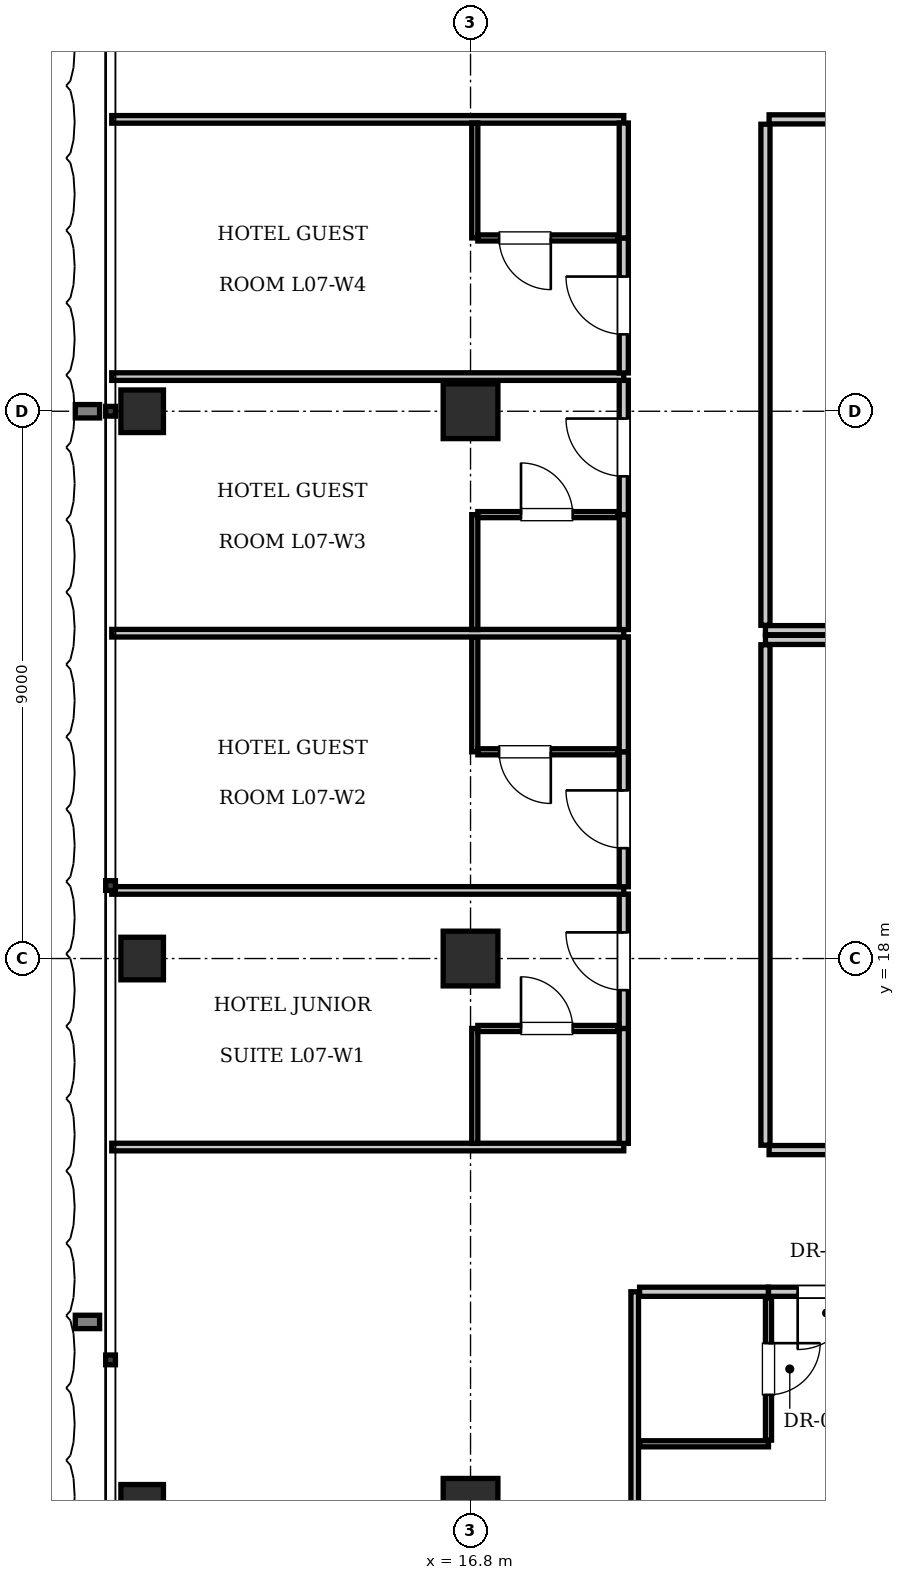
"""IFC4 building model, lengths in metres.
Left out: names, types, materials, properties, quantities, classifications, styles, units other than length and angle.
Written with IfcOpenShell. Run it as: python <this file> out.ifc"""

import sys

from ifc_helpers import new_model, si_unit, direction, frame, frame_2d, origin, origin_2d, place, context, subcontext, project, spatial, rectangle, i_section, extrude, element, fill, save


model = new_model("IFC4")
c1 = context("Model", 3, precision=1e-05, world=origin(), true_north=direction((0.0, 1.0)))
c2 = subcontext(c1, "Body", "Model", "MODEL_VIEW")
j1 = project(units=[si_unit("LENGTHUNIT", "METRE"), si_unit("PLANEANGLEUNIT", "RADIAN")], contexts=[c1])
p1 = place(None, origin())
s1 = spatial("IfcSite", under=j1, at=p1, CompositionType="ELEMENT")
p2 = place(p1, origin())
s2 = spatial("IfcBuilding", under=s1, at=p2, CompositionType="ELEMENT")
p3 = place(p2, frame((0.0, 0.0, 34.65)))
s3 = spatial("IfcBuildingStorey", under=s2, at=p3, CompositionType="ELEMENT", Elevation=34.65)
for number, where, z_axis, x_axis in (
    (1, (16.8, 9.0, 0.0), (0.0, 0.0, 1.0), (1.0, 0.0, 0.0)),
    (2, (16.8, 18.0, 0.0), (0.0, 0.0, 1.0), (1.0, 0.0, 0.0)),
    (3, (16.8, 27.0, 0.0), (0.0, 0.0, 1.0), (1.0, 0.0, 0.0)),
):
    element("IfcColumn", number, at=place(p3, frame(where, z_axis=z_axis, x_axis=x_axis)), inside=s3, PredefinedType="COLUMN", context=c2, shape_type="SweptSolid", body=[
        extrude(rectangle(XDim=0.9, YDim=0.9, at=origin_2d()), origin(), (0.0, 0.0, 1.0), 3.85),
    ])
for number, where, z_axis, x_axis in (
    (4, (11.4, 9.0, 0.0), (0.0, 0.0, 1.0), (1.0, 0.0, 0.0)),
    (5, (11.4, 18.0, 0.0), (0.0, 0.0, 1.0), (1.0, 0.0, 0.0)),
    (6, (11.4, 27.0, 0.0), (0.0, 0.0, 1.0), (1.0, 0.0, 0.0)),
):
    element("IfcColumn", number, at=place(p3, frame(where, z_axis=z_axis, x_axis=x_axis)), inside=s3, PredefinedType="COLUMN", context=c2, shape_type="SweptSolid", body=[
        extrude(i_section(OverallWidth=0.7, OverallDepth=0.7, WebThickness=0.028, FlangeThickness=0.044, at=origin_2d()), origin(), (0.0, 0.0, 1.0), 3.85),
    ])
p4 = place(p3, frame((21.65, 23.4, 0.0), z_axis=(0.0, 0.0, 1.0), x_axis=(1.0, 0.0, 0.0)))
e7 = element("IfcWall", 7, at=p4, inside=s3, PredefinedType="PARTITIONING", context=c2, shape_type="SweptSolid", body=[
    extrude(rectangle(XDim=32.3, YDim=0.15, at=frame_2d((16.15, 0.0))), origin(), (0.0, 0.0, 1.0), 3.61),
])
p5 = place(p3, frame((21.65, 23.48, 0.0), z_axis=(0.0, 0.0, 1.0), x_axis=(0.0, 1.0, 0.0)))
e8 = element("IfcWall", 8, at=p5, inside=s3, PredefinedType="PARTITIONING", context=c2, shape_type="SweptSolid", body=[
    extrude(rectangle(XDim=8.24, YDim=0.15, at=frame_2d((4.12, 0.0))), origin(), (0.0, 0.0, 1.0), 3.61),
])
p6 = place(p3, frame((21.71, 31.8, 0.0), z_axis=(0.0, 0.0, 1.0), x_axis=(1.0, 0.0, 0.0)))
e9 = element("IfcWall", 9, at=p6, inside=s3, PredefinedType="PARTITIONING", context=c2, shape_type="SweptSolid", body=[
    extrude(rectangle(XDim=5.078, YDim=0.15, at=frame_2d((2.539, 0.0))), origin(), (0.0, 0.0, 1.0), 3.61),
])
p7 = place(p6, frame((2.089, 0.0, 0.0)))
e10 = element("IfcOpeningElement", 10, at=p7, cuts=e9, PredefinedType="OPENING", context=c2, shape_type="SweptSolid", body=[
    extrude(rectangle(XDim=0.9, YDim=2.1, at=frame_2d((0.45, 1.05))), frame((0.0, 0.085, 0.0), z_axis=(0.0, -1.0, 0.0), x_axis=(1.0, 0.0, 0.0)), (0.0, 0.0, 1.0), 0.17),
])
p8 = place(p3, frame((21.65, 23.24, 0.0), z_axis=(0.0, 0.0, 1.0), x_axis=(1.0, 0.0, 0.0)))
e11 = element("IfcWall", 11, at=p8, inside=s3, PredefinedType="PARTITIONING", context=c2, shape_type="SweptSolid", body=[
    extrude(rectangle(XDim=32.3, YDim=0.15, at=frame_2d((16.15, 0.0))), origin(), (0.0, 0.0, 1.0), 3.61),
])
p9 = place(p3, frame((21.65, 14.93, 0.0), z_axis=(0.0, 0.0, 1.0), x_axis=(0.0, 1.0, 0.0)))
e12 = element("IfcWall", 12, at=p9, inside=s3, PredefinedType="PARTITIONING", context=c2, shape_type="SweptSolid", body=[
    extrude(rectangle(XDim=8.23, YDim=0.15, at=frame_2d((4.115, 0.0))), origin(), (0.0, 0.0, 1.0), 3.61),
])
p10 = place(p3, frame((21.71, 14.85, 0.0), z_axis=(0.0, 0.0, 1.0), x_axis=(1.0, 0.0, 0.0)))
e13 = element("IfcWall", 13, at=p10, inside=s3, PredefinedType="PARTITIONING", context=c2, shape_type="SweptSolid", body=[
    extrude(rectangle(XDim=11.861, YDim=0.15, at=frame_2d((5.931, 0.0))), origin(), (0.0, 0.0, 1.0), 3.61),
])
p11 = place(p10, frame((5.48, 0.0, 0.0)))
e14 = element("IfcOpeningElement", 14, at=p11, cuts=e13, PredefinedType="OPENING", context=c2, shape_type="SweptSolid", body=[
    extrude(rectangle(XDim=0.9, YDim=2.1, at=frame_2d((0.45, 1.05))), frame((0.0, 0.085, 0.0), z_axis=(0.0, -1.0, 0.0), x_axis=(1.0, 0.0, 0.0)), (0.0, 0.0, 1.0), 0.17),
])
p12 = place(p3, frame((19.5, 0.1, 0.0), z_axis=(0.0, 0.0, 1.0), x_axis=(0.0, 1.0, 0.0)))
e15 = element("IfcWall", 15, at=p12, inside=s3, PredefinedType="PARTITIONING", context=c2, shape_type="SweptSolid", body=[
    extrude(rectangle(XDim=12.42, YDim=0.125, at=frame_2d((6.21, 0.0))), origin(), (0.0, 0.0, 1.0), 3.61),
])
p13 = place(p3, frame((19.58, 12.52, 0.0), z_axis=(0.0, 0.0, 1.0), x_axis=(1.0, 0.0, 0.0)))
e16 = element("IfcWall", 16, at=p13, inside=s3, PredefinedType="PARTITIONING", context=c2, shape_type="SweptSolid", body=[
    extrude(rectangle(XDim=2.12, YDim=0.15, at=frame_2d((1.06, 0.0))), origin(), (0.0, 0.0, 1.0), 3.61),
])
p14 = place(p3, frame((19.58, 10.02, 0.0), z_axis=(0.0, 0.0, 1.0), x_axis=(1.0, 0.0, 0.0)))
e17 = element("IfcWall", 17, at=p14, inside=s3, PredefinedType="PARTITIONING", context=c2, shape_type="SweptSolid", body=[
    extrude(rectangle(XDim=2.12, YDim=0.1, at=frame_2d((1.06, 0.0))), origin(), (0.0, 0.0, 1.0), 3.61),
])
p15 = place(p3, frame((21.7, 10.08, 0.0), z_axis=(0.0, 0.0, 1.0), x_axis=(0.0, 1.0, 0.0)))
e18 = element("IfcWall", 18, at=p15, inside=s3, PredefinedType="PARTITIONING", context=c2, shape_type="SweptSolid", body=[
    extrude(rectangle(XDim=2.34, YDim=0.1, at=frame_2d((1.17, 0.0))), origin(), (0.0, 0.0, 1.0), 3.61),
])
p16 = place(p15, frame((0.745, 0.0, 0.0)))
e19 = element("IfcOpeningElement", 19, at=p16, cuts=e18, PredefinedType="OPENING", context=c2, shape_type="SweptSolid", body=[
    extrude(rectangle(XDim=0.85, YDim=2.1, at=frame_2d((0.425, 1.05))), frame((0.0, 0.06, 0.0), z_axis=(0.0, -1.0, 0.0), x_axis=(1.0, 0.0, 0.0)), (0.0, 0.0, 1.0), 0.12),
])
p17 = place(p3, frame((21.7, 12.52, 0.0), z_axis=(0.0, 0.0, 1.0), x_axis=(1.0, 0.0, 0.0)))
e20 = element("IfcWall", 20, at=p17, inside=s3, PredefinedType="PARTITIONING", context=c2, shape_type="SweptSolid", body=[
    extrude(rectangle(XDim=1.91, YDim=0.15, at=frame_2d((0.955, 0.0))), origin(), (0.0, 0.0, 1.0), 3.61),
])
p18 = place(p17, frame((0.48, 0.0, 0.0)))
e21 = element("IfcOpeningElement", 21, at=p18, cuts=e20, PredefinedType="OPENING", context=c2, shape_type="SweptSolid", body=[
    extrude(rectangle(XDim=0.95, YDim=2.15, at=frame_2d((0.475, 1.075))), frame((0.0, 0.085, 0.0), z_axis=(0.0, -1.0, 0.0), x_axis=(1.0, 0.0, 0.0)), (0.0, 0.0, 1.0), 0.17),
])
for number, where, z_axis, x_axis in (
    (22, (10.9, 14.9, 0.0), (0.0, 0.0, 1.0), (1.0, 0.0, 0.0)),
    (23, (10.9, 31.8, 0.0), (0.0, 0.0, 1.0), (1.0, 0.0, 0.0)),
):
    element("IfcWall", number, at=place(p3, frame(where, z_axis=z_axis, x_axis=x_axis)), inside=s3, PredefinedType="PARTITIONING", context=c2, shape_type="SweptSolid", body=[
        extrude(rectangle(XDim=8.42, YDim=0.125, at=frame_2d((4.21, 0.0))), origin(), (0.0, 0.0, 1.0), 3.61),
    ])
p19 = place(p3, frame((19.32, 14.96, 0.0), z_axis=(0.0, 0.0, 1.0), x_axis=(0.0, 1.0, 0.0)))
e24 = element("IfcWall", 24, at=p19, inside=s3, PredefinedType="PARTITIONING", context=c2, shape_type="SweptSolid", body=[
    extrude(rectangle(XDim=1.89, YDim=0.15, at=frame_2d((0.945, 0.0))), origin(), (0.0, 0.0, 1.0), 3.61),
])
p20 = place(p3, frame((19.32, 16.85, 0.0), z_axis=(0.0, 0.0, 1.0), x_axis=(0.0, 1.0, 0.0)))
e25 = element("IfcWall", 25, at=p20, inside=s3, PredefinedType="PARTITIONING", context=c2, shape_type="SweptSolid", body=[
    extrude(rectangle(XDim=2.21, YDim=0.15, at=frame_2d((1.105, 0.0))), origin(), (0.0, 0.0, 1.0), 3.61),
])
p21 = place(p20, frame((0.63, 0.0, 0.0)))
e26 = element("IfcOpeningElement", 26, at=p21, cuts=e25, PredefinedType="OPENING", context=c2, shape_type="SweptSolid", body=[
    extrude(rectangle(XDim=0.95, YDim=2.15, at=frame_2d((0.475, 1.075))), frame((0.0, 0.085, 0.0), z_axis=(0.0, -1.0, 0.0), x_axis=(1.0, 0.0, 0.0)), (0.0, 0.0, 1.0), 0.17),
])
p22 = place(p3, frame((16.87, 14.96, 0.0), z_axis=(0.0, 0.0, 1.0), x_axis=(0.0, 1.0, 0.0)))
e27 = element("IfcWall", 27, at=p22, inside=s3, PredefinedType="PARTITIONING", context=c2, shape_type="SweptSolid", body=[
    extrude(rectangle(XDim=1.89, YDim=0.1, at=frame_2d((0.945, 0.0))), origin(), (0.0, 0.0, 1.0), 2.988),
])
p23 = place(p3, frame((16.92, 16.85, 0.0), z_axis=(0.0, 0.0, 1.0), x_axis=(1.0, 0.0, 0.0)))
e28 = element("IfcWall", 28, at=p23, inside=s3, PredefinedType="PARTITIONING", context=c2, shape_type="SweptSolid", body=[
    extrude(rectangle(XDim=2.3, YDim=0.1, at=frame_2d((1.15, 0.0))), origin(), (0.0, 0.0, 1.0), 3.61),
])
p24 = place(p23, frame((0.71, 0.0, 0.0)))
e29 = element("IfcOpeningElement", 29, at=p24, cuts=e28, PredefinedType="OPENING", context=c2, shape_type="SweptSolid", body=[
    extrude(rectangle(XDim=0.85, YDim=2.1, at=frame_2d((0.425, 1.05))), frame((0.0, 0.06, 0.0), z_axis=(0.0, -1.0, 0.0), x_axis=(1.0, 0.0, 0.0)), (0.0, 0.0, 1.0), 0.12),
])
p25 = place(p3, frame((10.9, 19.12, 0.0), z_axis=(0.0, 0.0, 1.0), x_axis=(1.0, 0.0, 0.0)))
e30 = element("IfcWall", 30, at=p25, inside=s3, PredefinedType="PARTITIONING", context=c2, shape_type="SweptSolid", body=[
    extrude(rectangle(XDim=8.42, YDim=0.125, at=frame_2d((4.21, 0.0))), origin(), (0.0, 0.0, 1.0), 3.61),
])
p26 = place(p3, frame((19.32, 19.18, 0.0), z_axis=(0.0, 0.0, 1.0), x_axis=(0.0, 1.0, 0.0)))
e31 = element("IfcWall", 31, at=p26, inside=s3, PredefinedType="PARTITIONING", context=c2, shape_type="SweptSolid", body=[
    extrude(rectangle(XDim=2.22, YDim=0.15, at=frame_2d((1.11, 0.0))), origin(), (0.0, 0.0, 1.0), 3.61),
])
p27 = place(p26, frame((0.635, 0.0, 0.0)))
e32 = element("IfcOpeningElement", 32, at=p27, cuts=e31, PredefinedType="OPENING", context=c2, shape_type="SweptSolid", body=[
    extrude(rectangle(XDim=0.95, YDim=2.15, at=frame_2d((0.475, 1.075))), frame((0.0, 0.085, 0.0), z_axis=(0.0, -1.0, 0.0), x_axis=(1.0, 0.0, 0.0)), (0.0, 0.0, 1.0), 0.17),
])
p28 = place(p3, frame((19.32, 21.4, 0.0), z_axis=(0.0, 0.0, 1.0), x_axis=(0.0, 1.0, 0.0)))
e33 = element("IfcWall", 33, at=p28, inside=s3, PredefinedType="PARTITIONING", context=c2, shape_type="SweptSolid", body=[
    extrude(rectangle(XDim=1.89, YDim=0.15, at=frame_2d((0.945, 0.0))), origin(), (0.0, 0.0, 1.0), 3.61),
])
p29 = place(p3, frame((16.87, 21.4, 0.0), z_axis=(0.0, 0.0, 1.0), x_axis=(0.0, 1.0, 0.0)))
e34 = element("IfcWall", 34, at=p29, inside=s3, PredefinedType="PARTITIONING", context=c2, shape_type="SweptSolid", body=[
    extrude(rectangle(XDim=1.89, YDim=0.1, at=frame_2d((0.945, 0.0))), origin(), (0.0, 0.0, 1.0), 2.988),
])
p30 = place(p3, frame((16.92, 21.4, 0.0), z_axis=(0.0, 0.0, 1.0), x_axis=(1.0, 0.0, 0.0)))
e35 = element("IfcWall", 35, at=p30, inside=s3, PredefinedType="PARTITIONING", context=c2, shape_type="SweptSolid", body=[
    extrude(rectangle(XDim=2.3, YDim=0.1, at=frame_2d((1.15, 0.0))), origin(), (0.0, 0.0, 1.0), 3.61),
])
p31 = place(p30, frame((0.35, 0.0, 0.0)))
e36 = element("IfcOpeningElement", 36, at=p31, cuts=e35, PredefinedType="OPENING", context=c2, shape_type="SweptSolid", body=[
    extrude(rectangle(XDim=0.85, YDim=2.1, at=frame_2d((0.425, 1.05))), frame((0.0, 0.06, 0.0), z_axis=(0.0, -1.0, 0.0), x_axis=(1.0, 0.0, 0.0)), (0.0, 0.0, 1.0), 0.12),
])
p32 = place(p3, frame((10.9, 23.35, 0.0), z_axis=(0.0, 0.0, 1.0), x_axis=(1.0, 0.0, 0.0)))
e37 = element("IfcWall", 37, at=p32, inside=s3, PredefinedType="PARTITIONING", context=c2, shape_type="SweptSolid", body=[
    extrude(rectangle(XDim=8.42, YDim=0.125, at=frame_2d((4.21, 0.0))), origin(), (0.0, 0.0, 1.0), 3.61),
])
p33 = place(p3, frame((19.32, 23.41, 0.0), z_axis=(0.0, 0.0, 1.0), x_axis=(0.0, 1.0, 0.0)))
e38 = element("IfcWall", 38, at=p33, inside=s3, PredefinedType="PARTITIONING", context=c2, shape_type="SweptSolid", body=[
    extrude(rectangle(XDim=1.89, YDim=0.15, at=frame_2d((0.945, 0.0))), origin(), (0.0, 0.0, 1.0), 3.61),
])
p34 = place(p3, frame((19.32, 25.3, 0.0), z_axis=(0.0, 0.0, 1.0), x_axis=(0.0, 1.0, 0.0)))
e39 = element("IfcWall", 39, at=p34, inside=s3, PredefinedType="PARTITIONING", context=c2, shape_type="SweptSolid", body=[
    extrude(rectangle(XDim=2.21, YDim=0.15, at=frame_2d((1.105, 0.0))), origin(), (0.0, 0.0, 1.0), 3.61),
])
p35 = place(p34, frame((0.63, 0.0, 0.0)))
e40 = element("IfcOpeningElement", 40, at=p35, cuts=e39, PredefinedType="OPENING", context=c2, shape_type="SweptSolid", body=[
    extrude(rectangle(XDim=0.95, YDim=2.15, at=frame_2d((0.475, 1.075))), frame((0.0, 0.085, 0.0), z_axis=(0.0, -1.0, 0.0), x_axis=(1.0, 0.0, 0.0)), (0.0, 0.0, 1.0), 0.17),
])
p36 = place(p3, frame((16.87, 23.41, 0.0), z_axis=(0.0, 0.0, 1.0), x_axis=(0.0, 1.0, 0.0)))
e41 = element("IfcWall", 41, at=p36, inside=s3, PredefinedType="PARTITIONING", context=c2, shape_type="SweptSolid", body=[
    extrude(rectangle(XDim=1.89, YDim=0.1, at=frame_2d((0.945, 0.0))), origin(), (0.0, 0.0, 1.0), 2.988),
])
p37 = place(p3, frame((16.92, 25.3, 0.0), z_axis=(0.0, 0.0, 1.0), x_axis=(1.0, 0.0, 0.0)))
e42 = element("IfcWall", 42, at=p37, inside=s3, PredefinedType="PARTITIONING", context=c2, shape_type="SweptSolid", body=[
    extrude(rectangle(XDim=2.3, YDim=0.1, at=frame_2d((1.15, 0.0))), origin(), (0.0, 0.0, 1.0), 3.61),
])
p38 = place(p37, frame((0.71, 0.0, 0.0)))
e43 = element("IfcOpeningElement", 43, at=p38, cuts=e42, PredefinedType="OPENING", context=c2, shape_type="SweptSolid", body=[
    extrude(rectangle(XDim=0.85, YDim=2.1, at=frame_2d((0.425, 1.05))), frame((0.0, 0.06, 0.0), z_axis=(0.0, -1.0, 0.0), x_axis=(1.0, 0.0, 0.0)), (0.0, 0.0, 1.0), 0.12),
])
p39 = place(p3, frame((10.9, 27.57, 0.0), z_axis=(0.0, 0.0, 1.0), x_axis=(1.0, 0.0, 0.0)))
e44 = element("IfcWall", 44, at=p39, inside=s3, PredefinedType="PARTITIONING", context=c2, shape_type="SweptSolid", body=[
    extrude(rectangle(XDim=8.42, YDim=0.125, at=frame_2d((4.21, 0.0))), origin(), (0.0, 0.0, 1.0), 3.61),
])
p40 = place(p3, frame((19.32, 27.63, 0.0), z_axis=(0.0, 0.0, 1.0), x_axis=(0.0, 1.0, 0.0)))
e45 = element("IfcWall", 45, at=p40, inside=s3, PredefinedType="PARTITIONING", context=c2, shape_type="SweptSolid", body=[
    extrude(rectangle(XDim=2.22, YDim=0.15, at=frame_2d((1.11, 0.0))), origin(), (0.0, 0.0, 1.0), 3.61),
])
p41 = place(p40, frame((0.635, 0.0, 0.0)))
e46 = element("IfcOpeningElement", 46, at=p41, cuts=e45, PredefinedType="OPENING", context=c2, shape_type="SweptSolid", body=[
    extrude(rectangle(XDim=0.95, YDim=2.15, at=frame_2d((0.475, 1.075))), frame((0.0, 0.085, 0.0), z_axis=(0.0, -1.0, 0.0), x_axis=(1.0, 0.0, 0.0)), (0.0, 0.0, 1.0), 0.17),
])
p42 = place(p3, frame((19.32, 29.85, 0.0), z_axis=(0.0, 0.0, 1.0), x_axis=(0.0, 1.0, 0.0)))
e47 = element("IfcWall", 47, at=p42, inside=s3, PredefinedType="PARTITIONING", context=c2, shape_type="SweptSolid", body=[
    extrude(rectangle(XDim=1.89, YDim=0.15, at=frame_2d((0.945, 0.0))), origin(), (0.0, 0.0, 1.0), 3.61),
])
p43 = place(p3, frame((16.87, 29.85, 0.0), z_axis=(0.0, 0.0, 1.0), x_axis=(0.0, 1.0, 0.0)))
e48 = element("IfcWall", 48, at=p43, inside=s3, PredefinedType="PARTITIONING", context=c2, shape_type="SweptSolid", body=[
    extrude(rectangle(XDim=1.89, YDim=0.1, at=frame_2d((0.945, 0.0))), origin(), (0.0, 0.0, 1.0), 2.988),
])
p44 = place(p3, frame((16.92, 29.85, 0.0), z_axis=(0.0, 0.0, 1.0), x_axis=(1.0, 0.0, 0.0)))
e49 = element("IfcWall", 49, at=p44, inside=s3, PredefinedType="PARTITIONING", context=c2, shape_type="SweptSolid", body=[
    extrude(rectangle(XDim=2.3, YDim=0.1, at=frame_2d((1.15, 0.0))), origin(), (0.0, 0.0, 1.0), 3.61),
])
p45 = place(p44, frame((0.35, 0.0, 0.0)))
e50 = element("IfcOpeningElement", 50, at=p45, cuts=e49, PredefinedType="OPENING", context=c2, shape_type="SweptSolid", body=[
    extrude(rectangle(XDim=0.85, YDim=2.1, at=frame_2d((0.425, 1.05))), frame((0.0, 0.06, 0.0), z_axis=(0.0, -1.0, 0.0), x_axis=(1.0, 0.0, 0.0)), (0.0, 0.0, 1.0), 0.12),
])
p46 = place(p16, frame((0.85, 0.0, 0.0), z_axis=(0.0, 0.0, 1.0), x_axis=(-1.0, 0.0, 0.0)))
e51 = element("IfcDoor", 51, at=p46, inside=s3, OperationType="SINGLE_SWING_LEFT", PredefinedType="DOOR", context=c2, shape_type="SweptSolid", body=[
    extrude(rectangle(XDim=0.85, YDim=2.1, at=frame_2d((0.425, 1.05))), frame((0.0, 0.025, 0.0), z_axis=(0.0, -1.0, 0.0), x_axis=(1.0, 0.0, 0.0)), (0.0, 0.0, 1.0), 0.05),
])
fill(e19, e51)
p47 = place(p18, frame((0.95, 0.0, 0.0), z_axis=(0.0, 0.0, 1.0), x_axis=(-1.0, 0.0, 0.0)))
e52 = element("IfcDoor", 52, at=p47, inside=s3, OperationType="SINGLE_SWING_RIGHT", PredefinedType="DOOR", context=c2, shape_type="SweptSolid", body=[
    extrude(rectangle(XDim=0.95, YDim=2.15, at=frame_2d((0.475, 1.075))), frame((0.0, 0.025, 0.0), z_axis=(0.0, -1.0, 0.0), x_axis=(1.0, 0.0, 0.0)), (0.0, 0.0, 1.0), 0.05),
])
fill(e21, e52)
p48 = place(p24, origin())
e53 = element("IfcDoor", 53, at=p48, inside=s3, OperationType="SINGLE_SWING_LEFT", PredefinedType="DOOR", context=c2, shape_type="SweptSolid", body=[
    extrude(rectangle(XDim=0.85, YDim=2.1, at=frame_2d((0.425, 1.05))), frame((0.0, 0.025, 0.0), z_axis=(0.0, -1.0, 0.0), x_axis=(1.0, 0.0, 0.0)), (0.0, 0.0, 1.0), 0.05),
])
fill(e29, e53)
p49 = place(p21, origin())
e54 = element("IfcDoor", 54, at=p49, inside=s3, OperationType="SINGLE_SWING_RIGHT", PredefinedType="DOOR", context=c2, shape_type="SweptSolid", body=[
    extrude(rectangle(XDim=0.95, YDim=2.15, at=frame_2d((0.475, 1.075))), frame((0.0, 0.025, 0.0), z_axis=(0.0, -1.0, 0.0), x_axis=(1.0, 0.0, 0.0)), (0.0, 0.0, 1.0), 0.05),
])
fill(e26, e54)
p50 = place(p31, frame((0.85, 0.0, 0.0), z_axis=(0.0, 0.0, 1.0), x_axis=(-1.0, 0.0, 0.0)))
e55 = element("IfcDoor", 55, at=p50, inside=s3, OperationType="SINGLE_SWING_LEFT", PredefinedType="DOOR", context=c2, shape_type="SweptSolid", body=[
    extrude(rectangle(XDim=0.85, YDim=2.1, at=frame_2d((0.425, 1.05))), frame((0.0, 0.025, 0.0), z_axis=(0.0, -1.0, 0.0), x_axis=(1.0, 0.0, 0.0)), (0.0, 0.0, 1.0), 0.05),
])
fill(e36, e55)
p51 = place(p27, origin())
e56 = element("IfcDoor", 56, at=p51, inside=s3, OperationType="SINGLE_SWING_RIGHT", PredefinedType="DOOR", context=c2, shape_type="SweptSolid", body=[
    extrude(rectangle(XDim=0.95, YDim=2.15, at=frame_2d((0.475, 1.075))), frame((0.0, 0.025, 0.0), z_axis=(0.0, -1.0, 0.0), x_axis=(1.0, 0.0, 0.0)), (0.0, 0.0, 1.0), 0.05),
])
fill(e32, e56)
p52 = place(p38, origin())
e57 = element("IfcDoor", 57, at=p52, inside=s3, OperationType="SINGLE_SWING_LEFT", PredefinedType="DOOR", context=c2, shape_type="SweptSolid", body=[
    extrude(rectangle(XDim=0.85, YDim=2.1, at=frame_2d((0.425, 1.05))), frame((0.0, 0.025, 0.0), z_axis=(0.0, -1.0, 0.0), x_axis=(1.0, 0.0, 0.0)), (0.0, 0.0, 1.0), 0.05),
])
fill(e43, e57)
p53 = place(p35, origin())
e58 = element("IfcDoor", 58, at=p53, inside=s3, OperationType="SINGLE_SWING_RIGHT", PredefinedType="DOOR", context=c2, shape_type="SweptSolid", body=[
    extrude(rectangle(XDim=0.95, YDim=2.15, at=frame_2d((0.475, 1.075))), frame((0.0, 0.025, 0.0), z_axis=(0.0, -1.0, 0.0), x_axis=(1.0, 0.0, 0.0)), (0.0, 0.0, 1.0), 0.05),
])
fill(e40, e58)
p54 = place(p45, frame((0.85, 0.0, 0.0), z_axis=(0.0, 0.0, 1.0), x_axis=(-1.0, 0.0, 0.0)))
e59 = element("IfcDoor", 59, at=p54, inside=s3, OperationType="SINGLE_SWING_LEFT", PredefinedType="DOOR", context=c2, shape_type="SweptSolid", body=[
    extrude(rectangle(XDim=0.85, YDim=2.1, at=frame_2d((0.425, 1.05))), frame((0.0, 0.025, 0.0), z_axis=(0.0, -1.0, 0.0), x_axis=(1.0, 0.0, 0.0)), (0.0, 0.0, 1.0), 0.05),
])
fill(e50, e59)
p55 = place(p41, origin())
e60 = element("IfcDoor", 60, at=p55, inside=s3, OperationType="SINGLE_SWING_RIGHT", PredefinedType="DOOR", context=c2, shape_type="SweptSolid", body=[
    extrude(rectangle(XDim=0.95, YDim=2.15, at=frame_2d((0.475, 1.075))), frame((0.0, 0.025, 0.0), z_axis=(0.0, -1.0, 0.0), x_axis=(1.0, 0.0, 0.0)), (0.0, 0.0, 1.0), 0.05),
])
fill(e46, e60)
save(model, sys.argv[1])
